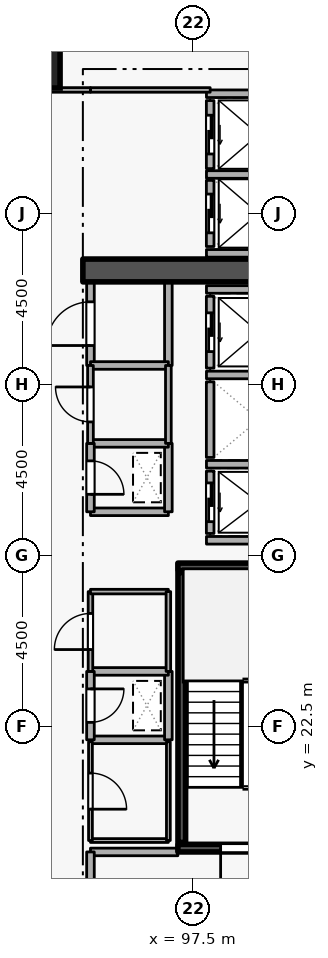
"""IFC4 building model, lengths in metres.
Left out: names, types, materials, properties, quantities, classifications, styles, units other than length and angle.
Written with IfcOpenShell. Run it as: python <this file> out.ifc"""

import sys

from ifc_helpers import new_model, si_unit, direction, frame, frame_2d, origin, origin_2d, place, context, subcontext, project, spatial, rectangle, extrude, element, fill, save


model = new_model("IFC4")
c1 = context("Model", 3, precision=1e-05, world=origin(), true_north=direction((0.0, 1.0)))
c2 = subcontext(c1, "Body", "Model", "MODEL_VIEW")
j1 = project(units=[si_unit("LENGTHUNIT", "METRE"), si_unit("PLANEANGLEUNIT", "RADIAN")], contexts=[c1])
p1 = place(None, origin())
s1 = spatial("IfcSite", under=j1, at=p1, CompositionType="ELEMENT")
p2 = place(p1, origin())
s2 = spatial("IfcBuilding", under=s1, at=p2, CompositionType="ELEMENT")
p3 = place(p2, frame((0.0, 0.0, 27.9)))
s3 = spatial("IfcBuildingStorey", under=s2, at=p3, CompositionType="ELEMENT", Elevation=27.9)
p4 = place(p3, frame((94.6, 34.5, 0.0), z_axis=(0.0, 0.0, 1.0), x_axis=(1.0, 0.0, 0.0)))
e1 = element("IfcWall", 1, at=p4, inside=s3, PredefinedType="SHEAR", context=c2, shape_type="SweptSolid", body=[
    extrude(rectangle(XDim=5.7, YDim=0.6, at=frame_2d((2.85, 0.0))), origin(), (0.0, 0.0, 1.0), 3.6),
])
p5 = place(p3, frame((93.3, 40.0, 0.0), z_axis=(0.0, 0.0, 1.0), x_axis=(1.0, 0.0, 0.0)))
e2 = element("IfcColumn", 2, at=p5, inside=s3, PredefinedType="COLUMN", context=c2, shape_type="SweptSolid", body=[
    extrude(rectangle(XDim=1.4, YDim=1.4, at=origin_2d()), origin(), (0.0, 0.0, 1.0), 3.6),
])
p6 = place(p3, frame((97.95, 29.22, 0.0), z_axis=(0.0, 0.0, 1.0), x_axis=(0.0, -1.0, 0.0)))
e3 = element("IfcWall", 3, at=p6, inside=s3, PredefinedType="STANDARD", context=c2, shape_type="SweptSolid", body=[
    extrude(rectangle(XDim=1.64, YDim=0.2, at=frame_2d((0.82, 0.0))), origin(), (0.0, 0.0, 1.0), 3.34),
])
p7 = place(p6, frame((0.31, 0.0, 0.0)))
e4 = element("IfcOpeningElement", 4, at=p7, cuts=e3, PredefinedType="OPENING", context=c2, shape_type="SweptSolid", body=[
    extrude(rectangle(XDim=1.02, YDim=2.06, at=frame_2d((0.51, 1.03))), frame((0.0, 0.11, 0.0), z_axis=(0.0, -1.0, 0.0), x_axis=(1.0, 0.0, 0.0)), (0.0, 0.0, 1.0), 0.22),
])
p8 = place(p3, frame((97.95, 31.57, 0.0), z_axis=(0.0, 0.0, 1.0), x_axis=(0.0, -1.0, 0.0)))
e5 = element("IfcWall", 5, at=p8, inside=s3, PredefinedType="STANDARD", context=c2, shape_type="SweptSolid", body=[
    extrude(rectangle(XDim=1.99, YDim=0.2, at=frame_2d((0.995, 0.0))), origin(), (0.0, 0.0, 1.0), 3.34),
])
p9 = place(p3, frame((97.95, 33.82, 0.0), z_axis=(0.0, 0.0, 1.0), x_axis=(0.0, -1.0, 0.0)))
e6 = element("IfcWall", 6, at=p9, inside=s3, PredefinedType="STANDARD", context=c2, shape_type="SweptSolid", body=[
    extrude(rectangle(XDim=1.89, YDim=0.2, at=frame_2d((0.945, 0.0))), origin(), (0.0, 0.0, 1.0), 3.34),
])
p10 = place(p9, frame((0.435, 0.0, 0.0)))
e7 = element("IfcOpeningElement", 7, at=p10, cuts=e6, PredefinedType="OPENING", context=c2, shape_type="SweptSolid", body=[
    extrude(rectangle(XDim=1.02, YDim=2.06, at=frame_2d((0.51, 1.03))), frame((0.0, 0.11, 0.0), z_axis=(0.0, -1.0, 0.0), x_axis=(1.0, 0.0, 0.0)), (0.0, 0.0, 1.0), 0.22),
])
p11 = place(p3, frame((97.95, 36.87, 0.0), z_axis=(0.0, 0.0, 1.0), x_axis=(0.0, -1.0, 0.0)))
e8 = element("IfcWall", 8, at=p11, inside=s3, PredefinedType="STANDARD", context=c2, shape_type="SweptSolid", body=[
    extrude(rectangle(XDim=1.74, YDim=0.2, at=frame_2d((0.87, 0.0))), origin(), (0.0, 0.0, 1.0), 3.34),
])
p12 = place(p11, frame((0.36, 0.0, 0.0)))
e9 = element("IfcOpeningElement", 9, at=p12, cuts=e8, PredefinedType="OPENING", context=c2, shape_type="SweptSolid", body=[
    extrude(rectangle(XDim=1.02, YDim=2.06, at=frame_2d((0.51, 1.03))), frame((0.0, 0.11, 0.0), z_axis=(0.0, -1.0, 0.0), x_axis=(1.0, 0.0, 0.0)), (0.0, 0.0, 1.0), 0.22),
])
p13 = place(p3, frame((97.95, 38.97, 0.0), z_axis=(0.0, 0.0, 1.0), x_axis=(0.0, -1.0, 0.0)))
e10 = element("IfcWall", 10, at=p13, inside=s3, PredefinedType="STANDARD", context=c2, shape_type="SweptSolid", body=[
    extrude(rectangle(XDim=1.79, YDim=0.2, at=frame_2d((0.895, 0.0))), origin(), (0.0, 0.0, 1.0), 3.34),
])
p14 = place(p13, frame((0.385, 0.0, 0.0)))
e11 = element("IfcOpeningElement", 11, at=p14, cuts=e10, PredefinedType="OPENING", context=c2, shape_type="SweptSolid", body=[
    extrude(rectangle(XDim=1.02, YDim=2.06, at=frame_2d((0.51, 1.03))), frame((0.0, 0.11, 0.0), z_axis=(0.0, -1.0, 0.0), x_axis=(1.0, 0.0, 0.0)), (0.0, 0.0, 1.0), 0.22),
])
for number, where, z_axis, x_axis in (
    (12, (97.852, 29.4, 0.0), (0.0, 0.0, 1.0), (1.0, 0.0, 0.0)),
    (13, (97.852, 27.4, 0.0), (0.0, 0.0, 1.0), (1.0, 0.0, 0.0)),
    (14, (97.852, 31.75, 0.0), (0.0, 0.0, 1.0), (1.0, 0.0, 0.0)),
    (15, (97.852, 34.0, 0.0), (0.0, 0.0, 1.0), (1.0, 0.0, 0.0)),
):
    element("IfcWall", number, at=place(p3, frame(where, z_axis=z_axis, x_axis=x_axis)), inside=s3, PredefinedType="STANDARD", context=c2, shape_type="SweptSolid", body=[
        extrude(rectangle(XDim=2.436, YDim=0.2, at=frame_2d((1.218, 0.0))), origin(), (0.0, 0.0, 1.0), 3.34),
    ])
for number, where, z_axis, x_axis in (
    (16, (97.852, 37.025, 0.0), (0.0, 0.0, 1.0), (1.0, 0.0, 0.0)),
    (17, (97.852, 34.95, 0.0), (0.0, 0.0, 1.0), (1.0, 0.0, 0.0)),
):
    element("IfcWall", number, at=place(p3, frame(where, z_axis=z_axis, x_axis=x_axis)), inside=s3, PredefinedType="STANDARD", context=c2, shape_type="SweptSolid", body=[
        extrude(rectangle(XDim=2.746, YDim=0.2, at=frame_2d((1.373, 0.0))), origin(), (0.0, 0.0, 1.0), 3.34),
    ])
p15 = place(p3, frame((97.852, 39.15, 0.0), z_axis=(0.0, 0.0, 1.0), x_axis=(1.0, 0.0, 0.0)))
e18 = element("IfcWall", 18, at=p15, inside=s3, PredefinedType="STANDARD", context=c2, shape_type="SweptSolid", body=[
    extrude(rectangle(XDim=2.636, YDim=0.2, at=frame_2d((1.318, 0.0))), origin(), (0.0, 0.0, 1.0), 3.34),
])
p16 = place(p3, frame((100.45, 19.3, 0.0), z_axis=(0.0, 0.0, 1.0), x_axis=(-1.0, 0.0, 0.0)))
e19 = element("IfcWall", 19, at=p16, inside=s3, PredefinedType="SHEAR", context=c2, shape_type="SweptSolid", body=[
    extrude(rectangle(XDim=3.35, YDim=0.2, at=frame_2d((1.675, 0.0))), origin(), (0.0, 0.0, 1.0), 3.6),
])
p17 = place(p16, frame((1.125, 0.0, 0.0)))
e20 = element("IfcOpeningElement", 20, at=p17, cuts=e19, PredefinedType="OPENING", context=c2, shape_type="SweptSolid", body=[
    extrude(rectangle(XDim=1.1, YDim=2.1, at=frame_2d((0.55, 1.05))), frame((0.0, 0.11, 0.0), z_axis=(0.0, -1.0, 0.0), x_axis=(1.0, 0.0, 0.0)), (0.0, 0.0, 1.0), 0.22),
])
p18 = place(p3, frame((97.1, 26.7, 0.0), z_axis=(0.0, 0.0, 1.0), x_axis=(1.0, 0.0, 0.0)))
e21 = element("IfcWall", 21, at=p18, inside=s3, PredefinedType="SHEAR", context=c2, shape_type="SweptSolid", body=[
    extrude(rectangle(XDim=3.35, YDim=0.2, at=frame_2d((1.675, 0.0))), origin(), (0.0, 0.0, 1.0), 3.6),
])
p19 = place(p3, frame((97.203, 26.55, 0.0), z_axis=(0.0, 0.0, 1.0), x_axis=(0.0, -1.0, 0.0)))
e22 = element("IfcWall", 22, at=p19, inside=s3, PredefinedType="SHEAR", context=c2, shape_type="SweptSolid", body=[
    extrude(rectangle(XDim=7.1, YDim=0.2, at=frame_2d((3.55, 0.0))), origin(), (0.0, 0.0, 1.0), 3.6),
])
p20 = place(p3, frame((97.1, 19.2, 0.0), z_axis=(0.0, 0.0, 1.0), x_axis=(-1.0, 0.0, 0.0)))
e23 = element("IfcWall", 23, at=p20, inside=s3, PredefinedType="STANDARD", context=c2, shape_type="SweptSolid", body=[
    extrude(rectangle(XDim=2.3, YDim=0.2, at=frame_2d((1.15, 0.0))), origin(), (0.0, 0.0, 1.0), 2.545),
])
p21 = place(p3, frame((94.8, 19.2, 0.0), z_axis=(0.0, 0.0, 1.0), x_axis=(0.0, -1.0, 0.0)))
e24 = element("IfcWall", 24, at=p21, inside=s3, PredefinedType="STANDARD", context=c2, shape_type="SweptSolid", body=[
    extrude(rectangle(XDim=2.5, YDim=0.2, at=frame_2d((1.25, 0.0))), origin(), (0.0, 0.0, 1.0), 3.34),
])
p22 = place(p3, frame((94.8, 28.15, 0.0), z_axis=(0.0, 0.0, 1.0), x_axis=(1.0, 0.0, 0.0)))
e25 = element("IfcWall", 25, at=p22, inside=s3, PredefinedType="STANDARD", context=c2, shape_type="SweptSolid", body=[
    extrude(rectangle(XDim=2.05, YDim=0.2, at=frame_2d((1.025, 0.0))), origin(), (0.0, 0.0, 1.0), 3.34),
])
p23 = place(p3, frame((96.85, 28.15, 0.0), z_axis=(0.0, 0.0, 1.0), x_axis=(0.0, 1.0, 0.0)))
e26 = element("IfcWall", 26, at=p23, inside=s3, PredefinedType="STANDARD", context=c2, shape_type="SweptSolid", body=[
    extrude(rectangle(XDim=1.8, YDim=0.2, at=frame_2d((0.9, 0.0))), origin(), (0.0, 0.0, 1.0), 3.34),
])
p24 = place(p3, frame((96.85, 29.95, 0.0), z_axis=(0.0, 0.0, 1.0), x_axis=(-1.0, 0.0, 0.0)))
e27 = element("IfcWall", 27, at=p24, inside=s3, PredefinedType="STANDARD", context=c2, shape_type="SweptSolid", body=[
    extrude(rectangle(XDim=2.05, YDim=0.2, at=frame_2d((1.025, 0.0))), origin(), (0.0, 0.0, 1.0), 3.34),
])
p25 = place(p3, frame((94.8, 29.95, 0.0), z_axis=(0.0, 0.0, 1.0), x_axis=(0.0, -1.0, 0.0)))
e28 = element("IfcWall", 28, at=p25, inside=s3, PredefinedType="STANDARD", context=c2, shape_type="SweptSolid", body=[
    extrude(rectangle(XDim=1.8, YDim=0.2, at=frame_2d((0.9, 0.0))), origin(), (0.0, 0.0, 1.0), 3.34),
])
p26 = place(p25, frame((0.46, 0.0, 0.0)))
e29 = element("IfcOpeningElement", 29, at=p26, cuts=e28, PredefinedType="OPENING", context=c2, shape_type="SweptSolid", body=[
    extrude(rectangle(XDim=0.88, YDim=2.04, at=frame_2d((0.44, 1.02))), frame((0.0, 0.11, 0.0), z_axis=(0.0, -1.0, 0.0), x_axis=(1.0, 0.0, 0.0)), (0.0, 0.0, 1.0), 0.22),
])
p27 = place(p3, frame((94.8, 22.15, 0.0), z_axis=(0.0, 0.0, 1.0), x_axis=(1.0, 0.0, 0.0)))
e30 = element("IfcWall", 30, at=p27, inside=s3, PredefinedType="STANDARD", context=c2, shape_type="SweptSolid", body=[
    extrude(rectangle(XDim=2.05, YDim=0.2, at=frame_2d((1.025, 0.0))), origin(), (0.0, 0.0, 1.0), 3.34),
])
p28 = place(p3, frame((96.85, 22.15, 0.0), z_axis=(0.0, 0.0, 1.0), x_axis=(0.0, 1.0, 0.0)))
e31 = element("IfcWall", 31, at=p28, inside=s3, PredefinedType="STANDARD", context=c2, shape_type="SweptSolid", body=[
    extrude(rectangle(XDim=1.8, YDim=0.2, at=frame_2d((0.9, 0.0))), origin(), (0.0, 0.0, 1.0), 3.34),
])
p29 = place(p3, frame((96.85, 23.95, 0.0), z_axis=(0.0, 0.0, 1.0), x_axis=(-1.0, 0.0, 0.0)))
e32 = element("IfcWall", 32, at=p29, inside=s3, PredefinedType="STANDARD", context=c2, shape_type="SweptSolid", body=[
    extrude(rectangle(XDim=2.05, YDim=0.2, at=frame_2d((1.025, 0.0))), origin(), (0.0, 0.0, 1.0), 3.34),
])
p30 = place(p3, frame((94.8, 23.95, 0.0), z_axis=(0.0, 0.0, 1.0), x_axis=(0.0, -1.0, 0.0)))
e33 = element("IfcWall", 33, at=p30, inside=s3, PredefinedType="STANDARD", context=c2, shape_type="SweptSolid", body=[
    extrude(rectangle(XDim=1.8, YDim=0.2, at=frame_2d((0.9, 0.0))), origin(), (0.0, 0.0, 1.0), 3.34),
])
p31 = place(p30, frame((0.46, 0.0, 0.0)))
e34 = element("IfcOpeningElement", 34, at=p31, cuts=e33, PredefinedType="OPENING", context=c2, shape_type="SweptSolid", body=[
    extrude(rectangle(XDim=0.88, YDim=2.04, at=frame_2d((0.44, 1.02))), frame((0.0, 0.11, 0.0), z_axis=(0.0, -1.0, 0.0), x_axis=(1.0, 0.0, 0.0)), (0.0, 0.0, 1.0), 0.22),
])
p32 = place(p3, frame((94.8, 32.0, 0.0), z_axis=(0.0, 0.0, 1.0), x_axis=(0.0, 1.0, 0.0)))
e35 = element("IfcWall", 35, at=p32, inside=s3, PredefinedType="STANDARD", context=c2, shape_type="SweptSolid", body=[
    extrude(rectangle(XDim=2.2, YDim=0.2, at=frame_2d((1.1, 0.0))), origin(), (0.0, 0.0, 1.0), 3.34),
])
p33 = place(p32, frame((0.525, 0.0, 0.0)))
e36 = element("IfcOpeningElement", 36, at=p33, cuts=e35, PredefinedType="OPENING", context=c2, shape_type="SweptSolid", body=[
    extrude(rectangle(XDim=1.15, YDim=2.1, at=frame_2d((0.575, 1.05))), frame((0.0, 0.11, 0.0), z_axis=(0.0, -1.0, 0.0), x_axis=(1.0, 0.0, 0.0)), (0.0, 0.0, 1.0), 0.22),
])
p34 = place(p3, frame((96.85, 34.2, 0.0), z_axis=(0.0, 0.0, 1.0), x_axis=(0.0, -1.0, 0.0)))
e37 = element("IfcWall", 37, at=p34, inside=s3, PredefinedType="STANDARD", context=c2, shape_type="SweptSolid", body=[
    extrude(rectangle(XDim=2.2, YDim=0.2, at=frame_2d((1.1, 0.0))), origin(), (0.0, 0.0, 1.0), 3.34),
])
p35 = place(p3, frame((96.85, 32.0, 0.0), z_axis=(0.0, 0.0, 1.0), x_axis=(-1.0, 0.0, 0.0)))
e38 = element("IfcWall", 38, at=p35, inside=s3, PredefinedType="STANDARD", context=c2, shape_type="SweptSolid", body=[
    extrude(rectangle(XDim=2.05, YDim=0.2, at=frame_2d((1.025, 0.0))), origin(), (0.0, 0.0, 1.0), 3.34),
])
p36 = place(p3, frame((94.8, 19.5, 0.0), z_axis=(0.0, 0.0, 1.0), x_axis=(1.0, 0.0, 0.0)))
e39 = element("IfcWall", 39, at=p36, inside=s3, PredefinedType="PARTITIONING", context=c2, shape_type="SweptSolid", body=[
    extrude(rectangle(XDim=2.05, YDim=0.1, at=frame_2d((1.025, 0.0))), origin(), (0.0, 0.0, 1.0), 2.545),
])
p37 = place(p3, frame((96.85, 19.5, 0.0), z_axis=(0.0, 0.0, 1.0), x_axis=(0.0, 1.0, 0.0)))
e40 = element("IfcWall", 40, at=p37, inside=s3, PredefinedType="PARTITIONING", context=c2, shape_type="SweptSolid", body=[
    extrude(rectangle(XDim=2.6, YDim=0.1, at=frame_2d((1.3, 0.0))), origin(), (0.0, 0.0, 1.0), 3.34),
])
p38 = place(p3, frame((94.8, 22.1, 0.0), z_axis=(0.0, 0.0, 1.0), x_axis=(0.0, -1.0, 0.0)))
e41 = element("IfcWall", 41, at=p38, inside=s3, PredefinedType="PARTITIONING", context=c2, shape_type="SweptSolid", body=[
    extrude(rectangle(XDim=2.6, YDim=0.1, at=frame_2d((1.3, 0.0))), origin(), (0.0, 0.0, 1.0), 3.34),
])
p39 = place(p38, frame((0.825, 0.0, 0.0)))
e42 = element("IfcOpeningElement", 42, at=p39, cuts=e41, PredefinedType="OPENING", context=c2, shape_type="SweptSolid", body=[
    extrude(rectangle(XDim=0.95, YDim=2.1, at=frame_2d((0.475, 1.05))), frame((0.0, 0.06, 0.0), z_axis=(0.0, -1.0, 0.0), x_axis=(1.0, 0.0, 0.0)), (0.0, 0.0, 1.0), 0.12),
])
p40 = place(p3, frame((94.8, 23.95, 0.0), z_axis=(0.0, 0.0, 1.0), x_axis=(0.0, 1.0, 0.0)))
e43 = element("IfcWall", 43, at=p40, inside=s3, PredefinedType="PARTITIONING", context=c2, shape_type="SweptSolid", body=[
    extrude(rectangle(XDim=2.1, YDim=0.12, at=frame_2d((1.05, 0.0))), origin(), (0.0, 0.0, 1.0), 3.34),
])
p41 = place(p40, frame((0.575, 0.0, 0.0)))
e44 = element("IfcOpeningElement", 44, at=p41, cuts=e43, PredefinedType="OPENING", context=c2, shape_type="SweptSolid", body=[
    extrude(rectangle(XDim=0.95, YDim=2.1, at=frame_2d((0.475, 1.05))), frame((0.0, 0.07, 0.0), z_axis=(0.0, -1.0, 0.0), x_axis=(1.0, 0.0, 0.0)), (0.0, 0.0, 1.0), 0.14),
])
p42 = place(p3, frame((94.8, 26.05, 0.0), z_axis=(0.0, 0.0, 1.0), x_axis=(1.0, 0.0, 0.0)))
e45 = element("IfcWall", 45, at=p42, inside=s3, PredefinedType="PARTITIONING", context=c2, shape_type="SweptSolid", body=[
    extrude(rectangle(XDim=2.05, YDim=0.12, at=frame_2d((1.025, 0.0))), origin(), (0.0, 0.0, 1.0), 3.34),
])
p43 = place(p3, frame((96.85, 26.05, 0.0), z_axis=(0.0, 0.0, 1.0), x_axis=(0.0, -1.0, 0.0)))
e46 = element("IfcWall", 46, at=p43, inside=s3, PredefinedType="PARTITIONING", context=c2, shape_type="SweptSolid", body=[
    extrude(rectangle(XDim=2.1, YDim=0.12, at=frame_2d((1.05, 0.0))), origin(), (0.0, 0.0, 1.0), 3.34),
])
p44 = place(p3, frame((94.8, 29.95, 0.0), z_axis=(0.0, 0.0, 1.0), x_axis=(0.0, 1.0, 0.0)))
e47 = element("IfcWall", 47, at=p44, inside=s3, PredefinedType="PARTITIONING", context=c2, shape_type="SweptSolid", body=[
    extrude(rectangle(XDim=2.05, YDim=0.15, at=frame_2d((1.025, 0.0))), origin(), (0.0, 0.0, 1.0), 3.34),
])
p45 = place(p44, frame((0.565, 0.0, 0.0)))
e48 = element("IfcOpeningElement", 48, at=p45, cuts=e47, PredefinedType="OPENING", context=c2, shape_type="SweptSolid", body=[
    extrude(rectangle(XDim=0.92, YDim=2.08, at=frame_2d((0.46, 1.04))), frame((0.0, 0.085, 0.0), z_axis=(0.0, -1.0, 0.0), x_axis=(1.0, 0.0, 0.0)), (0.0, 0.0, 1.0), 0.17),
])
p46 = place(p3, frame((96.85, 32.0, 0.0), z_axis=(0.0, 0.0, 1.0), x_axis=(0.0, -1.0, 0.0)))
e49 = element("IfcWall", 49, at=p46, inside=s3, PredefinedType="PARTITIONING", context=c2, shape_type="SweptSolid", body=[
    extrude(rectangle(XDim=2.05, YDim=0.15, at=frame_2d((1.025, 0.0))), origin(), (0.0, 0.0, 1.0), 3.34),
])
p47 = place(p3, frame((97.95, 39.25, 0.0), z_axis=(0.0, 0.0, 1.0), x_axis=(-1.0, 0.0, 0.0)))
e50 = element("IfcWall", 50, at=p47, inside=s3, PredefinedType="PARTITIONING", context=c2, shape_type="SweptSolid", body=[
    extrude(rectangle(XDim=3.15, YDim=0.12, at=frame_2d((1.575, 0.0))), origin(), (0.0, 0.0, 1.0), 3.34),
])
p48 = place(p3, frame((94.8, 39.25, 0.0), z_axis=(0.0, 0.0, 1.0), x_axis=(-1.0, 0.0, 0.0)))
e51 = element("IfcWall", 51, at=p48, inside=s3, PredefinedType="PARTITIONING", context=c2, shape_type="SweptSolid", body=[
    extrude(rectangle(XDim=1.85, YDim=0.12, at=frame_2d((0.925, 0.0))), origin(), (0.0, 0.0, 1.0), 3.34),
])
p49 = place(p7, origin())
e52 = element("IfcDoor", 52, at=p49, inside=s3, OperationType="SLIDING_TO_LEFT", PredefinedType="DOOR", context=c2, shape_type="SweptSolid", body=[
    extrude(rectangle(XDim=1.02, YDim=2.06, at=frame_2d((0.51, 1.03))), frame((0.0, 0.025, 0.0), z_axis=(0.0, -1.0, 0.0), x_axis=(1.0, 0.0, 0.0)), (0.0, 0.0, 1.0), 0.05),
])
fill(e4, e52)
p50 = place(p10, origin())
e53 = element("IfcDoor", 53, at=p50, inside=s3, OperationType="SLIDING_TO_LEFT", PredefinedType="DOOR", context=c2, shape_type="SweptSolid", body=[
    extrude(rectangle(XDim=1.02, YDim=2.06, at=frame_2d((0.51, 1.03))), frame((0.0, 0.025, 0.0), z_axis=(0.0, -1.0, 0.0), x_axis=(1.0, 0.0, 0.0)), (0.0, 0.0, 1.0), 0.05),
])
fill(e7, e53)
p51 = place(p12, origin())
e54 = element("IfcDoor", 54, at=p51, inside=s3, OperationType="SLIDING_TO_LEFT", PredefinedType="DOOR", context=c2, shape_type="SweptSolid", body=[
    extrude(rectangle(XDim=1.02, YDim=2.06, at=frame_2d((0.51, 1.03))), frame((0.0, 0.025, 0.0), z_axis=(0.0, -1.0, 0.0), x_axis=(1.0, 0.0, 0.0)), (0.0, 0.0, 1.0), 0.05),
])
fill(e9, e54)
p52 = place(p14, origin())
e55 = element("IfcDoor", 55, at=p52, inside=s3, OperationType="SLIDING_TO_LEFT", PredefinedType="DOOR", context=c2, shape_type="SweptSolid", body=[
    extrude(rectangle(XDim=1.02, YDim=2.06, at=frame_2d((0.51, 1.03))), frame((0.0, 0.025, 0.0), z_axis=(0.0, -1.0, 0.0), x_axis=(1.0, 0.0, 0.0)), (0.0, 0.0, 1.0), 0.05),
])
fill(e11, e55)
p53 = place(p17, origin())
e56 = element("IfcDoor", 56, at=p53, inside=s3, OperationType="SINGLE_SWING_RIGHT", PredefinedType="DOOR", context=c2, shape_type="SweptSolid", body=[
    extrude(rectangle(XDim=1.1, YDim=2.1, at=frame_2d((0.55, 1.05))), frame((0.0, 0.025, 0.0), z_axis=(0.0, -1.0, 0.0), x_axis=(1.0, 0.0, 0.0)), (0.0, 0.0, 1.0), 0.05),
])
fill(e20, e56)
p54 = place(p26, origin())
e57 = element("IfcDoor", 57, at=p54, inside=s3, OperationType="SINGLE_SWING_RIGHT", PredefinedType="DOOR", context=c2, shape_type="SweptSolid", body=[
    extrude(rectangle(XDim=0.88, YDim=2.04, at=frame_2d((0.44, 1.02))), frame((0.0, 0.025, 0.0), z_axis=(0.0, -1.0, 0.0), x_axis=(1.0, 0.0, 0.0)), (0.0, 0.0, 1.0), 0.05),
])
fill(e29, e57)
p55 = place(p31, origin())
e58 = element("IfcDoor", 58, at=p55, inside=s3, OperationType="SINGLE_SWING_LEFT", PredefinedType="DOOR", context=c2, shape_type="SweptSolid", body=[
    extrude(rectangle(XDim=0.88, YDim=2.04, at=frame_2d((0.44, 1.02))), frame((0.0, 0.025, 0.0), z_axis=(0.0, -1.0, 0.0), x_axis=(1.0, 0.0, 0.0)), (0.0, 0.0, 1.0), 0.05),
])
fill(e34, e58)
p56 = place(p39, origin())
e59 = element("IfcDoor", 59, at=p56, inside=s3, OperationType="SINGLE_SWING_RIGHT", PredefinedType="DOOR", context=c2, shape_type="SweptSolid", body=[
    extrude(rectangle(XDim=0.95, YDim=2.1, at=frame_2d((0.475, 1.05))), frame((0.0, 0.025, 0.0), z_axis=(0.0, -1.0, 0.0), x_axis=(1.0, 0.0, 0.0)), (0.0, 0.0, 1.0), 0.05),
])
fill(e42, e59)
p57 = place(p41, origin())
e60 = element("IfcDoor", 60, at=p57, inside=s3, OperationType="SINGLE_SWING_LEFT", PredefinedType="DOOR", context=c2, shape_type="SweptSolid", body=[
    extrude(rectangle(XDim=0.95, YDim=2.1, at=frame_2d((0.475, 1.05))), frame((0.0, 0.025, 0.0), z_axis=(0.0, -1.0, 0.0), x_axis=(1.0, 0.0, 0.0)), (0.0, 0.0, 1.0), 0.05),
])
fill(e44, e60)
p58 = place(p45, origin())
e61 = element("IfcDoor", 61, at=p58, inside=s3, OperationType="SINGLE_SWING_RIGHT", PredefinedType="DOOR", context=c2, shape_type="SweptSolid", body=[
    extrude(rectangle(XDim=0.92, YDim=2.08, at=frame_2d((0.46, 1.04))), frame((0.0, 0.025, 0.0), z_axis=(0.0, -1.0, 0.0), x_axis=(1.0, 0.0, 0.0)), (0.0, 0.0, 1.0), 0.05),
])
fill(e48, e61)
p59 = place(p33, origin())
e62 = element("IfcDoor", 62, at=p59, inside=s3, OperationType="SINGLE_SWING_LEFT", PredefinedType="DOOR", context=c2, shape_type="SweptSolid", body=[
    extrude(rectangle(XDim=1.15, YDim=2.1, at=frame_2d((0.575, 1.05))), frame((0.0, 0.025, 0.0), z_axis=(0.0, -1.0, 0.0), x_axis=(1.0, 0.0, 0.0)), (0.0, 0.0, 1.0), 0.05),
])
fill(e36, e62)
save(model, sys.argv[1])
